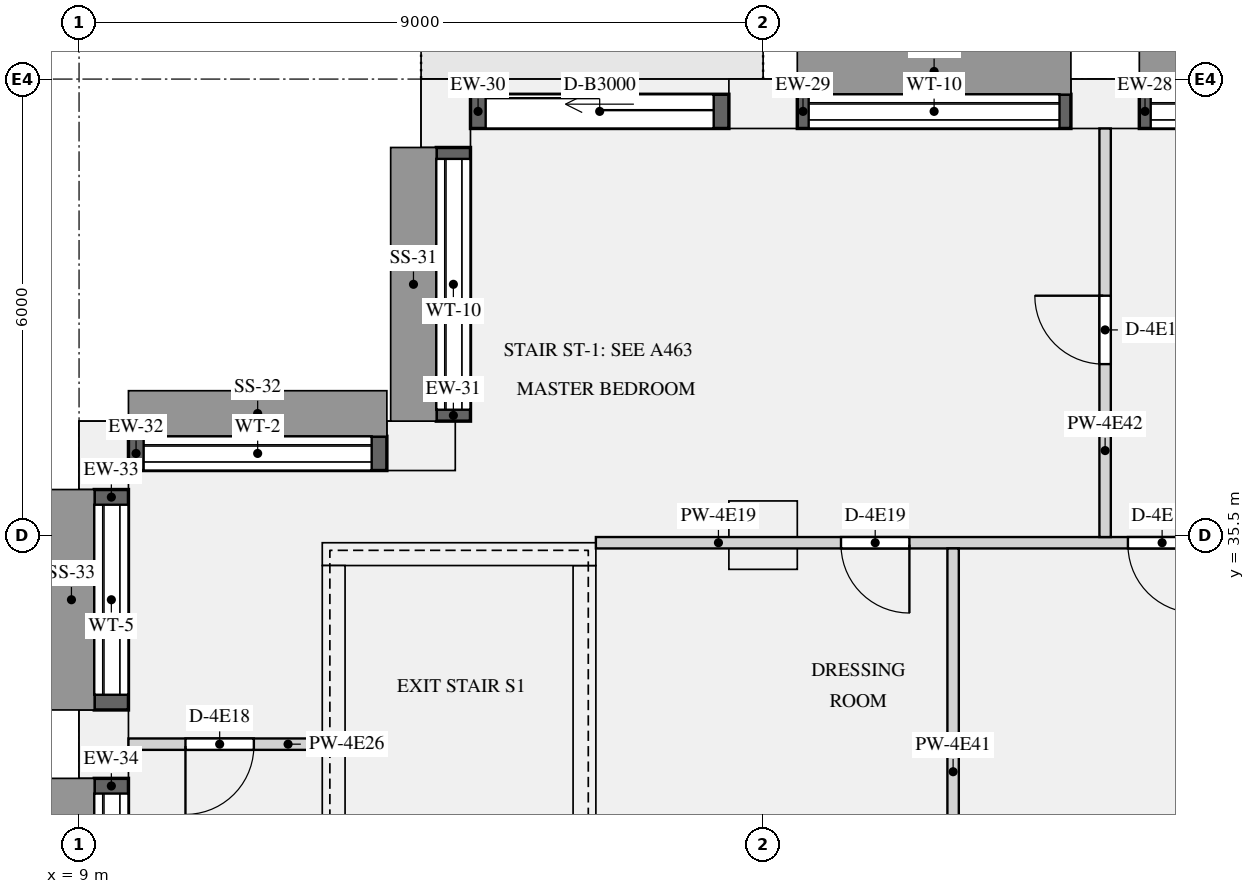
"""IFC4 building model, lengths in metres.
Left out: names, types, materials, properties, quantities, classifications, styles, units other than length and angle.
Written with IfcOpenShell. Run it as: python <this file> out.ifc"""

import sys

from ifc_helpers import new_model, si_unit, direction, frame, frame_2d, origin, origin_2d, place, context, subcontext, project, spatial, rectangle, extrude, element, fill, save


model = new_model("IFC4")
c1 = context("Model", 3, precision=1e-05, world=origin(), true_north=direction((0.0, 1.0)))
c2 = subcontext(c1, "Body", "Model", "MODEL_VIEW")
j1 = project(units=[si_unit("LENGTHUNIT", "METRE"), si_unit("PLANEANGLEUNIT", "RADIAN")], contexts=[c1])
p1 = place(None, origin())
s1 = spatial("IfcSite", under=j1, at=p1, CompositionType="ELEMENT")
p2 = place(p1, origin())
s2 = spatial("IfcBuilding", under=s1, at=p2, CompositionType="ELEMENT")
p3 = place(p2, frame((0.0, 0.0, 229.5)))
s3 = spatial("IfcBuildingStorey", under=s2, at=p3, CompositionType="ELEMENT", Elevation=229.5)
for number, where, z_axis, x_axis in (
    (1, (22.5, 41.175, 0.0), (0.0, 0.0, 1.0), (-1.0, 0.0, 0.0)),
    (2, (18.0, 41.175, 0.0), (0.0, 0.0, 1.0), (-1.0, 0.0, 0.0)),
    (3, (13.825, 41.05, 0.0), (0.0, 0.0, 1.0), (0.0, -1.0, 0.0)),
    (4, (13.5, 36.675, 0.0), (0.0, 0.0, 1.0), (-1.0, 0.0, 0.0)),
    (5, (9.325, 36.55, 0.0), (0.0, 0.0, 1.0), (0.0, -1.0, 0.0)),
    (6, (9.325, 32.75, 0.0), (0.0, 0.0, 1.0), (0.0, -1.0, 0.0)),
):
    element("IfcColumn", number, at=place(p3, frame(where, z_axis=z_axis, x_axis=x_axis)), inside=s3, PredefinedType="USERDEFINED", context=c2, shape_type="SweptSolid", body=[
        extrude(rectangle(XDim=0.9, YDim=0.65, at=origin_2d()), origin(), (0.0, 0.0, 1.0), 3.15),
    ])
p4 = place(p3, frame((18.0, 35.5, 0.0), z_axis=(0.0, 0.0, 1.0), x_axis=(1.0, 0.0, 0.0)))
e7 = element("IfcColumn", 7, at=p4, inside=s3, PredefinedType="COLUMN", context=c2, shape_type="SweptSolid", body=[
    extrude(rectangle(XDim=0.9, YDim=0.9, at=origin_2d()), origin(), (0.0, 0.0, 1.0), 3.15),
])
p5 = place(p3, frame((12.2, 35.25, 0.0), z_axis=(0.0, 0.0, 1.0), x_axis=(1.0, 0.0, 0.0)))
e8 = element("IfcWall", 8, at=p5, inside=s3, PredefinedType="SHEAR", context=c2, shape_type="SweptSolid", body=[
    extrude(rectangle(XDim=3.6, YDim=0.3, at=frame_2d((1.8, 0.0))), origin(), (0.0, 0.0, 1.0), 3.15),
])
for number, where, z_axis, x_axis in (
    (9, (12.35, 27.3, 0.0), (0.0, 0.0, 1.0), (0.0, 1.0, 0.0)),
    (10, (15.65, 27.3, 0.0), (0.0, 0.0, 1.0), (0.0, 1.0, 0.0)),
):
    element("IfcWall", number, at=place(p3, frame(where, z_axis=z_axis, x_axis=x_axis)), inside=s3, PredefinedType="SHEAR", context=c2, shape_type="SweptSolid", body=[
        extrude(rectangle(XDim=7.8, YDim=0.3, at=frame_2d((3.9, 0.0))), origin(), (0.0, 0.0, 1.0), 3.15),
    ])
p6 = place(p3, frame((26.55, 41.075, 0.9), z_axis=(0.0, 0.0, 1.0), x_axis=(-1.0, 0.0, 0.0)))
e11 = element("IfcWall", 11, at=p6, inside=s3, PredefinedType="SOLIDWALL", context=c2, shape_type="SweptSolid", body=[
    extrude(rectangle(XDim=3.6, YDim=0.45, at=frame_2d((1.8, 0.0))), origin(), (0.0, 0.0, 1.0), 1.93),
])
p7 = place(p6, frame((0.15, 0.0, 0.15)))
e12 = element("IfcOpeningElement", 12, at=p7, cuts=e11, PredefinedType="OPENING", context=c2, shape_type="SweptSolid", body=[
    extrude(rectangle(XDim=3.3, YDim=1.5, at=frame_2d((1.65, 0.75))), frame((0.0, 0.235, 0.0), z_axis=(0.0, -1.0, 0.0), x_axis=(1.0, 0.0, 0.0)), (0.0, 0.0, 1.0), 0.47),
])
p8 = place(p3, frame((22.05, 41.075, 0.9), z_axis=(0.0, 0.0, 1.0), x_axis=(-1.0, 0.0, 0.0)))
e13 = element("IfcWall", 13, at=p8, inside=s3, PredefinedType="SOLIDWALL", context=c2, shape_type="SweptSolid", body=[
    extrude(rectangle(XDim=3.6, YDim=0.45, at=frame_2d((1.8, 0.0))), origin(), (0.0, 0.0, 1.0), 1.93),
])
p9 = place(p8, frame((0.15, 0.0, 0.15)))
e14 = element("IfcOpeningElement", 14, at=p9, cuts=e13, PredefinedType="OPENING", context=c2, shape_type="SweptSolid", body=[
    extrude(rectangle(XDim=3.3, YDim=1.5, at=frame_2d((1.65, 0.75))), frame((0.0, 0.235, 0.0), z_axis=(0.0, -1.0, 0.0), x_axis=(1.0, 0.0, 0.0)), (0.0, 0.0, 1.0), 0.47),
])
p10 = place(p3, frame((17.55, 41.075, 0.0), z_axis=(0.0, 0.0, 1.0), x_axis=(-1.0, 0.0, 0.0)))
e15 = element("IfcWall", 15, at=p10, inside=s3, PredefinedType="SOLIDWALL", context=c2, shape_type="SweptSolid", body=[
    extrude(rectangle(XDim=3.4, YDim=0.45, at=frame_2d((1.7, 0.0))), origin(), (0.0, 0.0, 1.0), 2.83),
])
p11 = place(p10, frame((0.2, 0.0, 0.0)))
e16 = element("IfcOpeningElement", 16, at=p11, cuts=e15, PredefinedType="OPENING", context=c2, shape_type="SweptSolid", body=[
    extrude(rectangle(XDim=3.0, YDim=2.3, at=frame_2d((1.5, 1.15))), frame((0.0, 0.235, 0.0), z_axis=(0.0, -1.0, 0.0), x_axis=(1.0, 0.0, 0.0)), (0.0, 0.0, 1.0), 0.47),
])
p12 = place(p3, frame((13.925, 40.6, 0.9), z_axis=(0.0, 0.0, 1.0), x_axis=(0.0, -1.0, 0.0)))
e17 = element("IfcWall", 17, at=p12, inside=s3, PredefinedType="SOLIDWALL", context=c2, shape_type="SweptSolid", body=[
    extrude(rectangle(XDim=3.6, YDim=0.45, at=frame_2d((1.8, 0.0))), origin(), (0.0, 0.0, 1.0), 1.93),
])
p13 = place(p12, frame((0.15, 0.0, 0.15)))
e18 = element("IfcOpeningElement", 18, at=p13, cuts=e17, PredefinedType="OPENING", context=c2, shape_type="SweptSolid", body=[
    extrude(rectangle(XDim=3.3, YDim=1.5, at=frame_2d((1.65, 0.75))), frame((0.0, 0.235, 0.0), z_axis=(0.0, -1.0, 0.0), x_axis=(1.0, 0.0, 0.0)), (0.0, 0.0, 1.0), 0.47),
])
p14 = place(p3, frame((13.05, 36.575, 0.9), z_axis=(0.0, 0.0, 1.0), x_axis=(-1.0, 0.0, 0.0)))
e19 = element("IfcWall", 19, at=p14, inside=s3, PredefinedType="SOLIDWALL", context=c2, shape_type="SweptSolid", body=[
    extrude(rectangle(XDim=3.4, YDim=0.45, at=frame_2d((1.7, 0.0))), origin(), (0.0, 0.0, 1.0), 1.93),
])
p15 = place(p14, frame((0.2, 0.0, 0.15)))
e20 = element("IfcOpeningElement", 20, at=p15, cuts=e19, PredefinedType="OPENING", context=c2, shape_type="SweptSolid", body=[
    extrude(rectangle(XDim=3.0, YDim=1.5, at=frame_2d((1.5, 0.75))), frame((0.0, 0.235, 0.0), z_axis=(0.0, -1.0, 0.0), x_axis=(1.0, 0.0, 0.0)), (0.0, 0.0, 1.0), 0.47),
])
p16 = place(p3, frame((9.425, 36.1, 0.9), z_axis=(0.0, 0.0, 1.0), x_axis=(0.0, -1.0, 0.0)))
e21 = element("IfcWall", 21, at=p16, inside=s3, PredefinedType="SOLIDWALL", context=c2, shape_type="SweptSolid", body=[
    extrude(rectangle(XDim=2.9, YDim=0.45, at=frame_2d((1.45, 0.0))), origin(), (0.0, 0.0, 1.0), 1.93),
])
p17 = place(p16, frame((0.2, 0.0, 0.15)))
e22 = element("IfcOpeningElement", 22, at=p17, cuts=e21, PredefinedType="OPENING", context=c2, shape_type="SweptSolid", body=[
    extrude(rectangle(XDim=2.5, YDim=1.5, at=frame_2d((1.25, 0.75))), frame((0.0, 0.235, 0.0), z_axis=(0.0, -1.0, 0.0), x_axis=(1.0, 0.0, 0.0)), (0.0, 0.0, 1.0), 0.47),
])
p18 = place(p3, frame((9.425, 32.3, 0.9), z_axis=(0.0, 0.0, 1.0), x_axis=(0.0, -1.0, 0.0)))
e23 = element("IfcWall", 23, at=p18, inside=s3, PredefinedType="SOLIDWALL", context=c2, shape_type="SweptSolid", body=[
    extrude(rectangle(XDim=3.15, YDim=0.45, at=frame_2d((1.575, 0.0))), origin(), (0.0, 0.0, 1.0), 1.93),
])
p19 = place(p18, frame((0.2, 0.0, 0.15)))
e24 = element("IfcOpeningElement", 24, at=p19, cuts=e23, PredefinedType="OPENING", context=c2, shape_type="SweptSolid", body=[
    extrude(rectangle(XDim=2.75, YDim=1.5, at=frame_2d((1.375, 0.75))), frame((0.0, 0.235, 0.0), z_axis=(0.0, -1.0, 0.0), x_axis=(1.0, 0.0, 0.0)), (0.0, 0.0, 1.0), 0.47),
])
p20 = place(p3, frame((15.8, 35.4, 0.0), z_axis=(0.0, 0.0, 1.0), x_axis=(1.0, 0.0, 0.0)))
e25 = element("IfcWall", 25, at=p20, inside=s3, PredefinedType="PARTITIONING", context=c2, shape_type="SweptSolid", body=[
    extrude(rectangle(XDim=11.2, YDim=0.15, at=frame_2d((5.6, 0.0))), origin(), (0.0, 0.0, 1.0), 2.83),
])
p21 = place(p20, frame((8.725, 0.0, 0.0)))
e26 = element("IfcOpeningElement", 26, at=p21, cuts=e25, PredefinedType="OPENING", context=c2, shape_type="SweptSolid", body=[
    extrude(rectangle(XDim=1.5, YDim=2.1, at=frame_2d((0.75, 1.05))), frame((0.0, 0.085, 0.0), z_axis=(0.0, -1.0, 0.0), x_axis=(1.0, 0.0, 0.0)), (0.0, 0.0, 1.0), 0.17),
])
p22 = place(p20, frame((7.0, 0.0, 0.0)))
e27 = element("IfcOpeningElement", 27, at=p22, cuts=e25, PredefinedType="OPENING", context=c2, shape_type="SweptSolid", body=[
    extrude(rectangle(XDim=0.9, YDim=2.1, at=frame_2d((0.45, 1.05))), frame((0.0, 0.085, 0.0), z_axis=(0.0, -1.0, 0.0), x_axis=(1.0, 0.0, 0.0)), (0.0, 0.0, 1.0), 0.17),
])
p23 = place(p20, frame((3.225, 0.0, 0.0)))
e28 = element("IfcOpeningElement", 28, at=p23, cuts=e25, PredefinedType="OPENING", context=c2, shape_type="SweptSolid", body=[
    extrude(rectangle(XDim=0.9, YDim=2.1, at=frame_2d((0.45, 1.05))), frame((0.0, 0.085, 0.0), z_axis=(0.0, -1.0, 0.0), x_axis=(1.0, 0.0, 0.0)), (0.0, 0.0, 1.0), 0.17),
])
p24 = place(p3, frame((9.65, 32.75, 0.0), z_axis=(0.0, 0.0, 1.0), x_axis=(1.0, 0.0, 0.0)))
e29 = element("IfcWall", 29, at=p24, inside=s3, PredefinedType="PARTITIONING", context=c2, shape_type="SweptSolid", body=[
    extrude(rectangle(XDim=2.55, YDim=0.15, at=frame_2d((1.275, 0.0))), origin(), (0.0, 0.0, 1.0), 2.83),
])
p25 = place(p24, frame((0.75, 0.0, 0.0)))
e30 = element("IfcOpeningElement", 30, at=p25, cuts=e29, PredefinedType="OPENING", context=c2, shape_type="SweptSolid", body=[
    extrude(rectangle(XDim=0.9, YDim=2.1, at=frame_2d((0.45, 1.05))), frame((0.0, 0.085, 0.0), z_axis=(0.0, -1.0, 0.0), x_axis=(1.0, 0.0, 0.0)), (0.0, 0.0, 1.0), 0.17),
])
p26 = place(p3, frame((20.5, 27.1, 0.0), z_axis=(0.0, 0.0, 1.0), x_axis=(0.0, 1.0, 0.0)))
e31 = element("IfcWall", 31, at=p26, inside=s3, PredefinedType="PARTITIONING", context=c2, shape_type="SweptSolid", body=[
    extrude(rectangle(XDim=8.225, YDim=0.15, at=frame_2d((4.112, 0.0))), origin(), (0.0, 0.0, 1.0), 2.83),
])
p27 = place(p26, frame((1.45, 0.0, 0.0)))
e32 = element("IfcOpeningElement", 32, at=p27, cuts=e31, PredefinedType="OPENING", context=c2, shape_type="SweptSolid", body=[
    extrude(rectangle(XDim=0.9, YDim=2.1, at=frame_2d((0.45, 1.05))), frame((0.0, 0.085, 0.0), z_axis=(0.0, -1.0, 0.0), x_axis=(1.0, 0.0, 0.0)), (0.0, 0.0, 1.0), 0.17),
])
p28 = place(p3, frame((22.5, 35.475, 0.0), z_axis=(0.0, 0.0, 1.0), x_axis=(0.0, 1.0, 0.0)))
e33 = element("IfcWall", 33, at=p28, inside=s3, PredefinedType="PARTITIONING", context=c2, shape_type="SweptSolid", body=[
    extrude(rectangle(XDim=5.375, YDim=0.15, at=frame_2d((2.688, 0.0))), origin(), (0.0, 0.0, 1.0), 2.83),
])
p29 = place(p28, frame((2.275, 0.0, 0.0)))
e34 = element("IfcOpeningElement", 34, at=p29, cuts=e33, PredefinedType="OPENING", context=c2, shape_type="SweptSolid", body=[
    extrude(rectangle(XDim=0.9, YDim=2.1, at=frame_2d((0.45, 1.05))), frame((0.0, 0.085, 0.0), z_axis=(0.0, -1.0, 0.0), x_axis=(1.0, 0.0, 0.0)), (0.0, 0.0, 1.0), 0.17),
])
p30 = place(p7, origin())
e35 = element("IfcWindow", 35, at=p30, inside=s3, PartitioningType="SINGLE_PANEL", PredefinedType="WINDOW", context=c2, shape_type="SweptSolid", body=[
    extrude(rectangle(XDim=3.3, YDim=1.5, at=frame_2d((1.65, 0.75))), frame((0.0, -0.065, 0.0), z_axis=(0.0, -1.0, 0.0), x_axis=(1.0, 0.0, 0.0)), (0.0, 0.0, 1.0), 0.06),
])
fill(e12, e35)
p31 = place(p9, origin())
e36 = element("IfcWindow", 36, at=p31, inside=s3, PartitioningType="SINGLE_PANEL", PredefinedType="WINDOW", context=c2, shape_type="SweptSolid", body=[
    extrude(rectangle(XDim=3.3, YDim=1.5, at=frame_2d((1.65, 0.75))), frame((0.0, -0.065, 0.0), z_axis=(0.0, -1.0, 0.0), x_axis=(1.0, 0.0, 0.0)), (0.0, 0.0, 1.0), 0.06),
])
fill(e14, e36)
p32 = place(p11, origin())
e37 = element("IfcDoor", 37, at=p32, inside=s3, OperationType="SLIDING_TO_LEFT", PredefinedType="DOOR", context=c2, shape_type="SweptSolid", body=[
    extrude(rectangle(XDim=3.0, YDim=2.3, at=frame_2d((1.5, 1.15))), frame((0.0, -0.07, 0.0), z_axis=(0.0, -1.0, 0.0), x_axis=(1.0, 0.0, 0.0)), (0.0, 0.0, 1.0), 0.05),
])
fill(e16, e37)
p33 = place(p13, origin())
e38 = element("IfcWindow", 38, at=p33, inside=s3, PartitioningType="SINGLE_PANEL", PredefinedType="WINDOW", context=c2, shape_type="SweptSolid", body=[
    extrude(rectangle(XDim=3.3, YDim=1.5, at=frame_2d((1.65, 0.75))), frame((0.0, -0.065, 0.0), z_axis=(0.0, -1.0, 0.0), x_axis=(1.0, 0.0, 0.0)), (0.0, 0.0, 1.0), 0.06),
])
fill(e18, e38)
p34 = place(p15, origin())
e39 = element("IfcWindow", 39, at=p34, inside=s3, PartitioningType="SINGLE_PANEL", PredefinedType="WINDOW", context=c2, shape_type="SweptSolid", body=[
    extrude(rectangle(XDim=3.0, YDim=1.5, at=frame_2d((1.5, 0.75))), frame((0.0, -0.065, 0.0), z_axis=(0.0, -1.0, 0.0), x_axis=(1.0, 0.0, 0.0)), (0.0, 0.0, 1.0), 0.06),
])
fill(e20, e39)
p35 = place(p17, origin())
e40 = element("IfcWindow", 40, at=p35, inside=s3, PartitioningType="SINGLE_PANEL", PredefinedType="WINDOW", context=c2, shape_type="SweptSolid", body=[
    extrude(rectangle(XDim=2.5, YDim=1.5, at=frame_2d((1.25, 0.75))), frame((0.0, -0.065, 0.0), z_axis=(0.0, -1.0, 0.0), x_axis=(1.0, 0.0, 0.0)), (0.0, 0.0, 1.0), 0.06),
])
fill(e22, e40)
p36 = place(p19, origin())
e41 = element("IfcWindow", 41, at=p36, inside=s3, PartitioningType="SINGLE_PANEL", PredefinedType="WINDOW", context=c2, shape_type="SweptSolid", body=[
    extrude(rectangle(XDim=2.75, YDim=1.5, at=frame_2d((1.375, 0.75))), frame((0.0, -0.065, 0.0), z_axis=(0.0, -1.0, 0.0), x_axis=(1.0, 0.0, 0.0)), (0.0, 0.0, 1.0), 0.06),
])
fill(e24, e41)
p37 = place(p22, frame((0.9, 0.0, 0.0), z_axis=(0.0, 0.0, 1.0), x_axis=(-1.0, 0.0, 0.0)))
e42 = element("IfcDoor", 42, at=p37, inside=s3, OperationType="SINGLE_SWING_LEFT", PredefinedType="DOOR", context=c2, shape_type="SweptSolid", body=[
    extrude(rectangle(XDim=0.9, YDim=2.1, at=frame_2d((0.45, 1.05))), frame((0.0, 0.025, 0.0), z_axis=(0.0, -1.0, 0.0), x_axis=(1.0, 0.0, 0.0)), (0.0, 0.0, 1.0), 0.05),
])
fill(e27, e42)
p38 = place(p29, origin())
e43 = element("IfcDoor", 43, at=p38, inside=s3, OperationType="SINGLE_SWING_RIGHT", PredefinedType="DOOR", context=c2, shape_type="SweptSolid", body=[
    extrude(rectangle(XDim=0.9, YDim=2.1, at=frame_2d((0.45, 1.05))), frame((0.0, 0.025, 0.0), z_axis=(0.0, -1.0, 0.0), x_axis=(1.0, 0.0, 0.0)), (0.0, 0.0, 1.0), 0.05),
])
fill(e34, e43)
p39 = place(p25, frame((0.9, 0.0, 0.0), z_axis=(0.0, 0.0, 1.0), x_axis=(-1.0, 0.0, 0.0)))
e44 = element("IfcDoor", 44, at=p39, inside=s3, OperationType="SINGLE_SWING_RIGHT", PredefinedType="DOOR", context=c2, shape_type="SweptSolid", body=[
    extrude(rectangle(XDim=0.9, YDim=2.1, at=frame_2d((0.45, 1.05))), frame((0.0, 0.025, 0.0), z_axis=(0.0, -1.0, 0.0), x_axis=(1.0, 0.0, 0.0)), (0.0, 0.0, 1.0), 0.05),
])
fill(e30, e44)
p40 = place(p23, frame((0.9, 0.0, 0.0), z_axis=(0.0, 0.0, 1.0), x_axis=(-1.0, 0.0, 0.0)))
e45 = element("IfcDoor", 45, at=p40, inside=s3, OperationType="SINGLE_SWING_LEFT", PredefinedType="DOOR", context=c2, shape_type="SweptSolid", body=[
    extrude(rectangle(XDim=0.9, YDim=2.1, at=frame_2d((0.45, 1.05))), frame((0.0, 0.025, 0.0), z_axis=(0.0, -1.0, 0.0), x_axis=(1.0, 0.0, 0.0)), (0.0, 0.0, 1.0), 0.05),
])
fill(e28, e45)
save(model, sys.argv[1])
